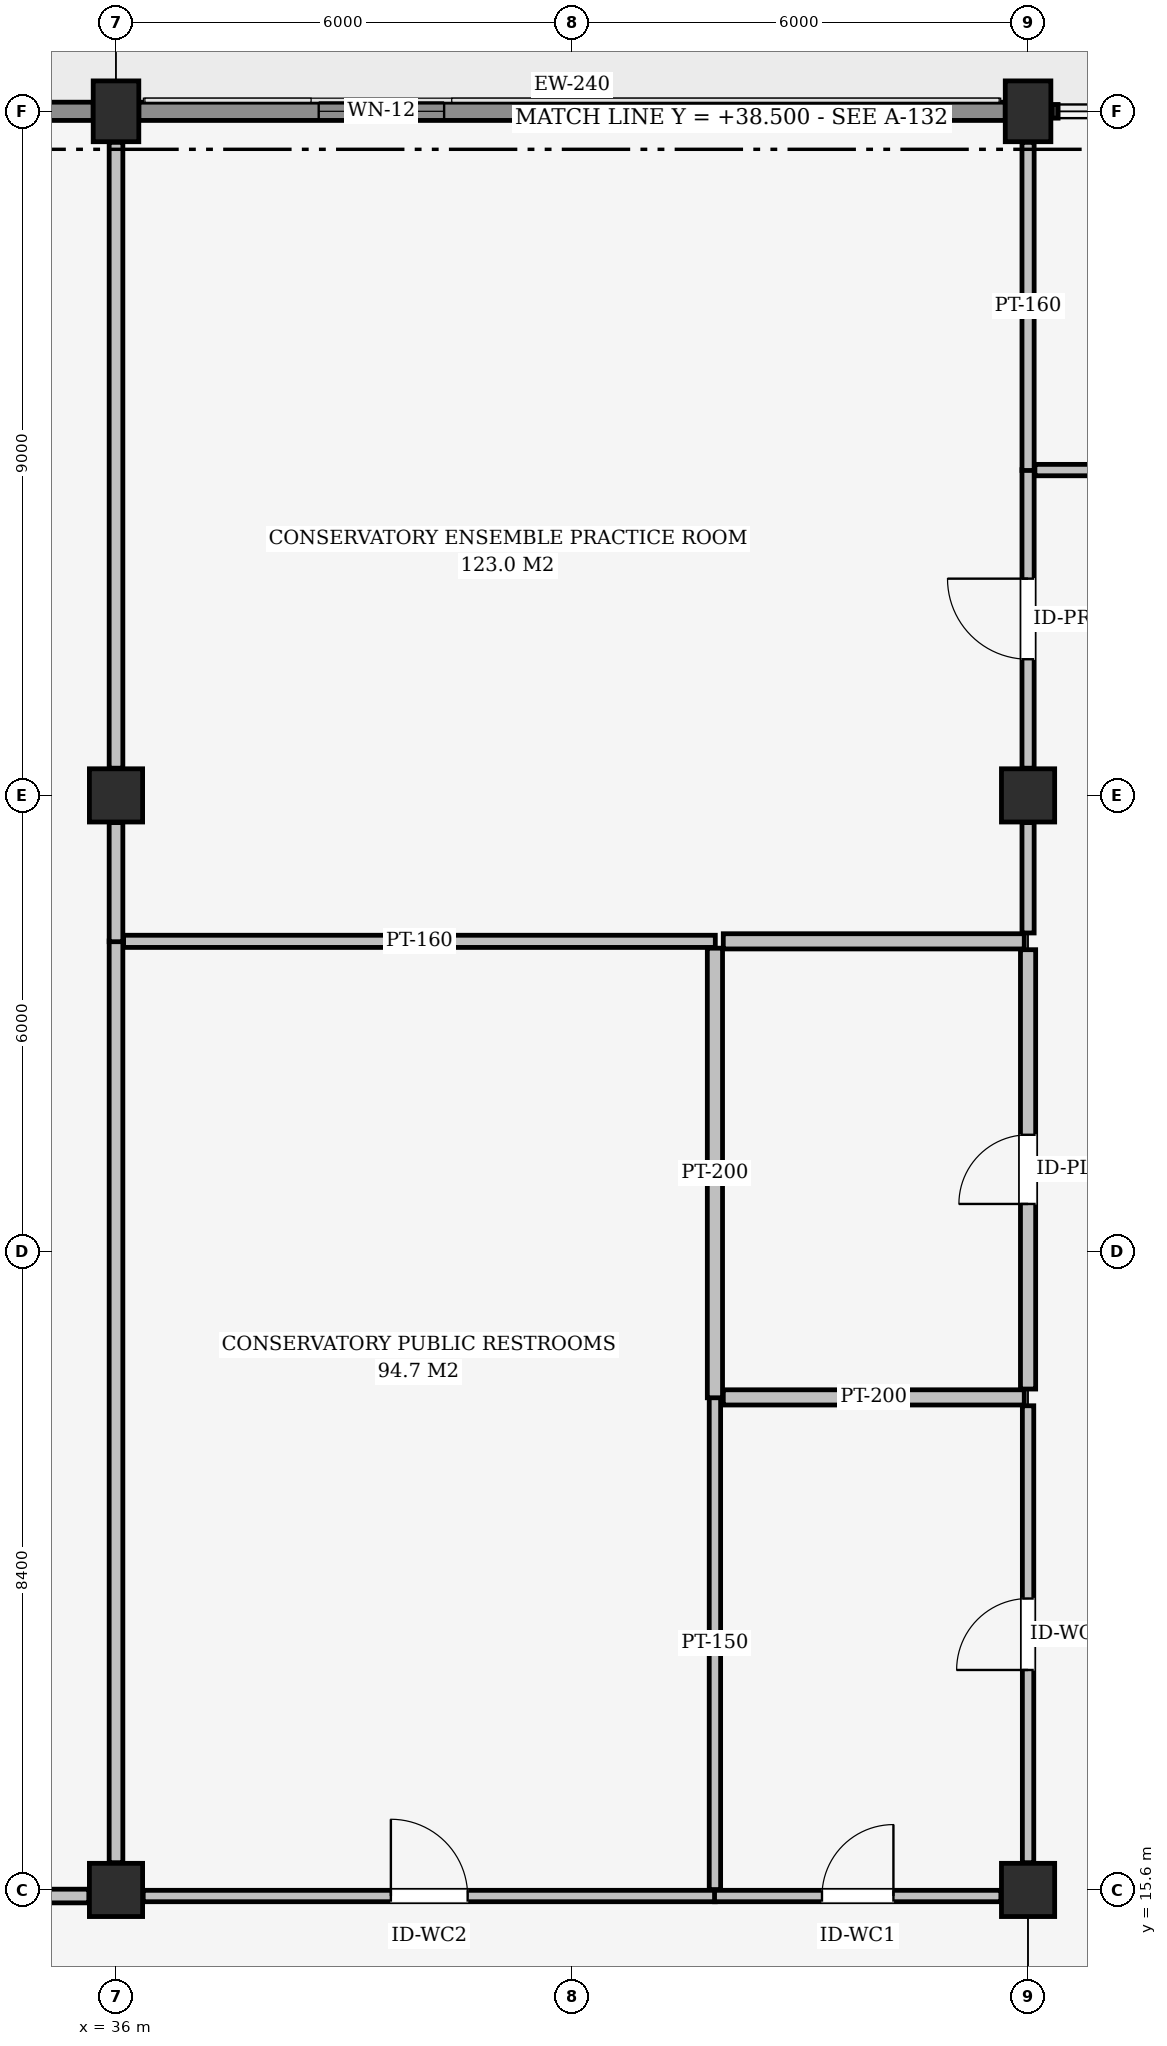
"""IFC4 building model, lengths in metres.
Left out: names, types, materials, properties, quantities, classifications, styles, units other than length and angle.
Written with IfcOpenShell. Run it as: python <this file> out.ifc"""

import sys

from ifc_helpers import new_model, si_unit, direction, frame, frame_2d, origin, origin_2d, place, context, subcontext, project, spatial, rectangle, extrude, element, fill, save


model = new_model("IFC4")
c1 = context("Model", 3, precision=1e-05, world=origin(), true_north=direction((0.0, 1.0)))
c2 = subcontext(c1, "Body", "Model", "MODEL_VIEW")
j1 = project(units=[si_unit("LENGTHUNIT", "METRE"), si_unit("PLANEANGLEUNIT", "RADIAN")], contexts=[c1])
p1 = place(None, origin())
s1 = spatial("IfcSite", under=j1, at=p1, CompositionType="ELEMENT")
p2 = place(p1, origin())
s2 = spatial("IfcBuilding", under=s1, at=p2, CompositionType="ELEMENT")
p3 = place(p2, frame((0.0, 0.0, 9.3)))
s3 = spatial("IfcBuildingStorey", under=s2, at=p3, CompositionType="ELEMENT", Elevation=9.3)
for number, where, z_axis, x_axis in (
    (1, (36.0, 39.0, 0.0), (0.0, 0.0, 1.0), (1.0, 0.0, 0.0)),
    (2, (48.0, 39.0, 0.0), (0.0, 0.0, 1.0), (1.0, 0.0, 0.0)),
):
    element("IfcColumn", number, at=place(p3, frame(where, z_axis=z_axis, x_axis=x_axis)), inside=s3, PredefinedType="COLUMN", context=c2, shape_type="SweptSolid", body=[
        extrude(rectangle(XDim=0.6, YDim=0.8, at=origin_2d()), origin(), (0.0, 0.0, 1.0), 4.5),
    ])
for number, where, z_axis, x_axis in (
    (3, (36.0, 15.6, 0.0), (0.0, 0.0, 1.0), (1.0, 0.0, 0.0)),
    (4, (36.0, 30.0, 0.0), (0.0, 0.0, 1.0), (1.0, 0.0, 0.0)),
    (5, (48.0, 15.6, 0.0), (0.0, 0.0, 1.0), (1.0, 0.0, 0.0)),
    (6, (48.0, 30.0, 0.0), (0.0, 0.0, 1.0), (1.0, 0.0, 0.0)),
):
    element("IfcColumn", number, at=place(p3, frame(where, z_axis=z_axis, x_axis=x_axis)), inside=s3, PredefinedType="COLUMN", context=c2, shape_type="SweptSolid", body=[
        extrude(rectangle(XDim=0.7, YDim=0.7, at=origin_2d()), origin(), (0.0, 0.0, 1.0), 4.5),
    ])
p4 = place(p3, frame((24.3, 39.0, 0.0), z_axis=(0.0, 0.0, 1.0), x_axis=(1.0, 0.0, 0.0)))
e7 = element("IfcWall", 7, at=p4, inside=s3, PredefinedType="SOLIDWALL", context=c2, shape_type="SweptSolid", body=[
    extrude(rectangle(XDim=11.4, YDim=0.24, at=frame_2d((5.7, 0.0))), origin(), (0.0, 0.0, 1.0), 3.873),
])
p5 = place(p4, frame((4.9, 0.0, 0.0)))
e8 = element("IfcOpeningElement", 8, at=p5, cuts=e7, PredefinedType="OPENING", context=c2, shape_type="SweptSolid", body=[
    extrude(rectangle(XDim=1.6, YDim=2.3, at=frame_2d((0.8, 1.15))), frame((0.0, 0.13, 0.0), z_axis=(0.0, -1.0, 0.0), x_axis=(1.0, 0.0, 0.0)), (0.0, 0.0, 1.0), 0.26),
])
p6 = place(p3, frame((36.3, 39.0, 0.0), z_axis=(0.0, 0.0, 1.0), x_axis=(1.0, 0.0, 0.0)))
e9 = element("IfcWall", 9, at=p6, inside=s3, PredefinedType="SOLIDWALL", context=c2, shape_type="SweptSolid", body=[
    extrude(rectangle(XDim=11.4, YDim=0.24, at=frame_2d((5.7, 0.0))), origin(), (0.0, 0.0, 1.0), 3.873),
])
p7 = place(p6, frame((2.367, 0.0, 0.85)))
e10 = element("IfcOpeningElement", 10, at=p7, cuts=e9, PredefinedType="OPENING", context=c2, shape_type="SweptSolid", body=[
    extrude(rectangle(XDim=1.65, YDim=1.75, at=frame_2d((0.825, 0.875))), frame((0.0, 0.13, 0.0), z_axis=(0.0, -1.0, 0.0), x_axis=(1.0, 0.0, 0.0)), (0.0, 0.0, 1.0), 0.26),
])
p8 = place(p3, frame((24.18, 15.52, 0.0), z_axis=(0.0, 0.0, 1.0), x_axis=(1.0, 0.0, 0.0)))
e11 = element("IfcWall", 11, at=p8, inside=s3, PredefinedType="PARTITIONING", context=c2, shape_type="SweptSolid", body=[
    extrude(rectangle(XDim=11.462, YDim=0.18, at=frame_2d((5.731, 0.0))), origin(), (0.0, 0.0, 1.0), 3.18),
])
p9 = place(p8, frame((4.871, 0.0, 0.0)))
e12 = element("IfcOpeningElement", 12, at=p9, cuts=e11, PredefinedType="OPENING", context=c2, shape_type="SweptSolid", body=[
    extrude(rectangle(XDim=1.72, YDim=2.34, at=frame_2d((0.86, 1.17))), frame((0.0, 0.1, 0.0), z_axis=(0.0, -1.0, 0.0), x_axis=(1.0, 0.0, 0.0)), (0.0, 0.0, 1.0), 0.2),
])
p10 = place(p3, frame((36.358, 15.52, 0.0), z_axis=(0.0, 0.0, 1.0), x_axis=(1.0, 0.0, 0.0)))
e13 = element("IfcWall", 13, at=p10, inside=s3, PredefinedType="PARTITIONING", context=c2, shape_type="SweptSolid", body=[
    extrude(rectangle(XDim=7.527, YDim=0.15, at=frame_2d((3.764, 0.0))), origin(), (0.0, 0.0, 1.0), 3.873),
])
p11 = place(p10, frame((3.259, 0.0, 0.0)))
e14 = element("IfcOpeningElement", 14, at=p11, cuts=e13, PredefinedType="OPENING", context=c2, shape_type="SweptSolid", body=[
    extrude(rectangle(XDim=1.01, YDim=2.1, at=frame_2d((0.505, 1.05))), frame((0.0, 0.085, 0.0), z_axis=(0.0, -1.0, 0.0), x_axis=(1.0, 0.0, 0.0)), (0.0, 0.0, 1.0), 0.17),
])
p12 = place(p3, frame((43.875, 15.52, 0.0), z_axis=(0.0, 0.0, 1.0), x_axis=(1.0, 0.0, 0.0)))
e15 = element("IfcWall", 15, at=p12, inside=s3, PredefinedType="PARTITIONING", context=c2, shape_type="SweptSolid", body=[
    extrude(rectangle(XDim=3.767, YDim=0.15, at=frame_2d((1.884, 0.0))), origin(), (0.0, 0.0, 1.0), 3.873),
])
p13 = place(p12, frame((1.414, 0.0, 0.0)))
e16 = element("IfcOpeningElement", 16, at=p13, cuts=e15, PredefinedType="OPENING", context=c2, shape_type="SweptSolid", body=[
    extrude(rectangle(XDim=0.94, YDim=2.1, at=frame_2d((0.47, 1.05))), frame((0.0, 0.085, 0.0), z_axis=(0.0, -1.0, 0.0), x_axis=(1.0, 0.0, 0.0)), (0.0, 0.0, 1.0), 0.17),
])
p14 = place(p3, frame((36.0, 15.958, 0.0), z_axis=(0.0, 0.0, 1.0), x_axis=(0.0, 1.0, 0.0)))
e17 = element("IfcWall", 17, at=p14, inside=s3, PredefinedType="PARTITIONING", context=c2, shape_type="SweptSolid", body=[
    extrude(rectangle(XDim=12.127, YDim=0.18, at=frame_2d((6.063, 0.0))), origin(), (0.0, 0.0, 1.0), 3.869),
])
p15 = place(p3, frame((36.0, 28.075, 0.0), z_axis=(0.0, 0.0, 1.0), x_axis=(0.0, 1.0, 0.0)))
e18 = element("IfcWall", 18, at=p15, inside=s3, PredefinedType="PARTITIONING", context=c2, shape_type="SweptSolid", body=[
    extrude(rectangle(XDim=1.567, YDim=0.18, at=frame_2d((0.784, 0.0))), origin(), (0.0, 0.0, 1.0), 3.869),
])
p16 = place(p3, frame((36.0, 30.358, 0.0), z_axis=(0.0, 0.0, 1.0), x_axis=(0.0, 1.0, 0.0)))
e19 = element("IfcWall", 19, at=p16, inside=s3, PredefinedType="PARTITIONING", context=c2, shape_type="SweptSolid", body=[
    extrude(rectangle(XDim=8.234, YDim=0.18, at=frame_2d((4.117, 0.0))), origin(), (0.0, 0.0, 1.0), 3.869),
])
p17 = place(p3, frame((43.88, 15.605, 0.0), z_axis=(0.0, 0.0, 1.0), x_axis=(0.0, 1.0, 0.0)))
e20 = element("IfcWall", 20, at=p17, inside=s3, PredefinedType="PARTITIONING", context=c2, shape_type="SweptSolid", body=[
    extrude(rectangle(XDim=6.48, YDim=0.15, at=frame_2d((3.24, 0.0))), origin(), (0.0, 0.0, 1.0), 4.5),
])
p18 = place(p3, frame((36.1, 28.08, 0.0), z_axis=(0.0, 0.0, 1.0), x_axis=(1.0, 0.0, 0.0)))
e21 = element("IfcWall", 21, at=p18, inside=s3, PredefinedType="PARTITIONING", context=c2, shape_type="SweptSolid", body=[
    extrude(rectangle(XDim=7.785, YDim=0.16, at=frame_2d((3.893, 0.0))), origin(), (0.0, 0.0, 1.0), 4.5),
])
p19 = place(p3, frame((43.88, 22.075, 0.0), z_axis=(0.0, 0.0, 1.0), x_axis=(0.0, 1.0, 0.0)))
e22 = element("IfcWall", 22, at=p19, inside=s3, PredefinedType="PARTITIONING", context=c2, shape_type="SweptSolid", body=[
    extrude(rectangle(XDim=5.915, YDim=0.2, at=frame_2d((2.958, 0.0))), origin(), (0.0, 0.0, 1.0), 4.5),
])
p20 = place(p3, frame((43.99, 22.08, 0.0), z_axis=(0.0, 0.0, 1.0), x_axis=(1.0, 0.0, 0.0)))
e23 = element("IfcWall", 23, at=p20, inside=s3, PredefinedType="PARTITIONING", context=c2, shape_type="SweptSolid", body=[
    extrude(rectangle(XDim=3.96, YDim=0.2, at=frame_2d((1.98, 0.0))), origin(), (0.0, 0.0, 1.0), 4.5),
])
p21 = place(p3, frame((48.0, 15.958, 0.0), z_axis=(0.0, 0.0, 1.0), x_axis=(0.0, 1.0, 0.0)))
e24 = element("IfcWall", 24, at=p21, inside=s3, PredefinedType="PARTITIONING", context=c2, shape_type="SweptSolid", body=[
    extrude(rectangle(XDim=6.012, YDim=0.15, at=frame_2d((3.006, 0.0))), origin(), (0.0, 0.0, 1.0), 3.739),
])
p22 = place(p21, frame((2.536, 0.0, 0.0)))
e25 = element("IfcOpeningElement", 25, at=p22, cuts=e24, PredefinedType="OPENING", context=c2, shape_type="SweptSolid", body=[
    extrude(rectangle(XDim=0.94, YDim=2.1, at=frame_2d((0.47, 1.05))), frame((0.0, 0.085, 0.0), z_axis=(0.0, -1.0, 0.0), x_axis=(1.0, 0.0, 0.0)), (0.0, 0.0, 1.0), 0.17),
])
p23 = place(p3, frame((43.99, 28.08, 0.0), z_axis=(0.0, 0.0, 1.0), x_axis=(1.0, 0.0, 0.0)))
e26 = element("IfcWall", 26, at=p23, inside=s3, PredefinedType="PARTITIONING", context=c2, shape_type="SweptSolid", body=[
    extrude(rectangle(XDim=3.96, YDim=0.2, at=frame_2d((1.98, 0.0))), origin(), (0.0, 0.0, 1.0), 4.5),
])
p24 = place(p3, frame((48.0, 28.19, 0.0), z_axis=(0.0, 0.0, 1.0), x_axis=(0.0, 1.0, 0.0)))
e27 = element("IfcWall", 27, at=p24, inside=s3, PredefinedType="PARTITIONING", context=c2, shape_type="SweptSolid", body=[
    extrude(rectangle(XDim=1.452, YDim=0.16, at=frame_2d((0.726, 0.0))), origin(), (0.0, 0.0, 1.0), 3.739),
])
p25 = place(p3, frame((48.0, 30.358, 0.0), z_axis=(0.0, 0.0, 1.0), x_axis=(0.0, 1.0, 0.0)))
e28 = element("IfcWall", 28, at=p25, inside=s3, PredefinedType="PARTITIONING", context=c2, shape_type="SweptSolid", body=[
    extrude(rectangle(XDim=3.927, YDim=0.16, at=frame_2d((1.963, 0.0))), origin(), (0.0, 0.0, 1.0), 3.739),
])
p26 = place(p25, frame((1.434, 0.0, 0.0)))
e29 = element("IfcOpeningElement", 29, at=p26, cuts=e28, PredefinedType="OPENING", context=c2, shape_type="SweptSolid", body=[
    extrude(rectangle(XDim=1.06, YDim=2.22, at=frame_2d((0.53, 1.11))), frame((0.0, 0.09, 0.0), z_axis=(0.0, -1.0, 0.0), x_axis=(1.0, 0.0, 0.0)), (0.0, 0.0, 1.0), 0.18),
])
p27 = place(p3, frame((48.0, 34.275, 0.0), z_axis=(0.0, 0.0, 1.0), x_axis=(0.0, 1.0, 0.0)))
e30 = element("IfcWall", 30, at=p27, inside=s3, PredefinedType="PARTITIONING", context=c2, shape_type="SweptSolid", body=[
    extrude(rectangle(XDim=4.317, YDim=0.16, at=frame_2d((2.159, 0.0))), origin(), (0.0, 0.0, 1.0), 3.739),
])
p28 = place(p3, frame((48.0, 22.19, 0.0), z_axis=(0.0, 0.0, 1.0), x_axis=(0.0, 1.0, 0.0)))
e31 = element("IfcWall", 31, at=p28, inside=s3, PredefinedType="PARTITIONING", context=c2, shape_type="SweptSolid", body=[
    extrude(rectangle(XDim=5.78, YDim=0.2, at=frame_2d((2.89, 0.0))), origin(), (0.0, 0.0, 1.0), 3.739),
])
p29 = place(p28, frame((2.435, 0.0, 0.0)))
e32 = element("IfcOpeningElement", 32, at=p29, cuts=e31, PredefinedType="OPENING", context=c2, shape_type="SweptSolid", body=[
    extrude(rectangle(XDim=0.91, YDim=2.1, at=frame_2d((0.455, 1.05))), frame((0.0, 0.11, 0.0), z_axis=(0.0, -1.0, 0.0), x_axis=(1.0, 0.0, 0.0)), (0.0, 0.0, 1.0), 0.22),
])
p30 = place(p3, frame((48.09, 34.28, 0.0), z_axis=(0.0, 0.0, 1.0), x_axis=(1.0, 0.0, 0.0)))
e33 = element("IfcWall", 33, at=p30, inside=s3, PredefinedType="PARTITIONING", context=c2, shape_type="SweptSolid", body=[
    extrude(rectangle(XDim=12.795, YDim=0.15, at=frame_2d((6.397, 0.0))), origin(), (0.0, 0.0, 1.0), 4.35),
])
p31 = place(p30, frame((5.893, 0.0, 0.0)))
e34 = element("IfcOpeningElement", 34, at=p31, cuts=e33, PredefinedType="OPENING", context=c2, shape_type="SweptSolid", body=[
    extrude(rectangle(XDim=1.01, YDim=2.1, at=frame_2d((0.505, 1.05))), frame((0.0, 0.085, 0.0), z_axis=(0.0, -1.0, 0.0), x_axis=(1.0, 0.0, 0.0)), (0.0, 0.0, 1.0), 0.17),
])
p32 = place(p7, origin())
e35 = element("IfcWindow", 35, at=p32, inside=s3, PartitioningType="SINGLE_PANEL", PredefinedType="WINDOW", context=c2, shape_type="SweptSolid", body=[
    extrude(rectangle(XDim=1.65, YDim=1.75, at=frame_2d((0.825, 0.875))), frame((0.0, 0.03, 0.0), z_axis=(0.0, -1.0, 0.0), x_axis=(1.0, 0.0, 0.0)), (0.0, 0.0, 1.0), 0.06),
])
fill(e10, e35)
p33 = place(p11, origin())
e36 = element("IfcDoor", 36, at=p33, inside=s3, OperationType="SINGLE_SWING_LEFT", PredefinedType="DOOR", context=c2, shape_type="SweptSolid", body=[
    extrude(rectangle(XDim=1.01, YDim=2.1, at=frame_2d((0.505, 1.05))), frame((0.0, 0.025, 0.0), z_axis=(0.0, -1.0, 0.0), x_axis=(1.0, 0.0, 0.0)), (0.0, 0.0, 1.0), 0.05),
])
fill(e14, e36)
p34 = place(p13, origin())
e37 = element("IfcDoor", 37, at=p34, inside=s3, OperationType="SINGLE_SWING_RIGHT", PredefinedType="DOOR", context=c2, shape_type="SweptSolid", body=[
    extrude(rectangle(XDim=0.94, YDim=2.1, at=frame_2d((0.47, 1.05))), frame((0.0, 0.025, 0.0), z_axis=(0.0, -1.0, 0.0), x_axis=(1.0, 0.0, 0.0)), (0.0, 0.0, 1.0), 0.05),
])
fill(e16, e37)
p35 = place(p22, origin())
e38 = element("IfcDoor", 38, at=p35, inside=s3, OperationType="SINGLE_SWING_LEFT", PredefinedType="DOOR", context=c2, shape_type="SweptSolid", body=[
    extrude(rectangle(XDim=0.94, YDim=2.1, at=frame_2d((0.47, 1.05))), frame((0.0, 0.025, 0.0), z_axis=(0.0, -1.0, 0.0), x_axis=(1.0, 0.0, 0.0)), (0.0, 0.0, 1.0), 0.05),
])
fill(e25, e38)
p36 = place(p26, origin())
e39 = element("IfcDoor", 39, at=p36, inside=s3, OperationType="SINGLE_SWING_RIGHT", PredefinedType="DOOR", context=c2, shape_type="SweptSolid", body=[
    extrude(rectangle(XDim=1.06, YDim=2.22, at=frame_2d((0.53, 1.11))), frame((0.0, 0.025, 0.0), z_axis=(0.0, -1.0, 0.0), x_axis=(1.0, 0.0, 0.0)), (0.0, 0.0, 1.0), 0.05),
])
fill(e29, e39)
p37 = place(p29, origin())
e40 = element("IfcDoor", 40, at=p37, inside=s3, OperationType="SINGLE_SWING_LEFT", PredefinedType="DOOR", context=c2, shape_type="SweptSolid", body=[
    extrude(rectangle(XDim=0.91, YDim=2.1, at=frame_2d((0.455, 1.05))), frame((0.0, 0.025, 0.0), z_axis=(0.0, -1.0, 0.0), x_axis=(1.0, 0.0, 0.0)), (0.0, 0.0, 1.0), 0.05),
])
fill(e32, e40)
save(model, sys.argv[1])
